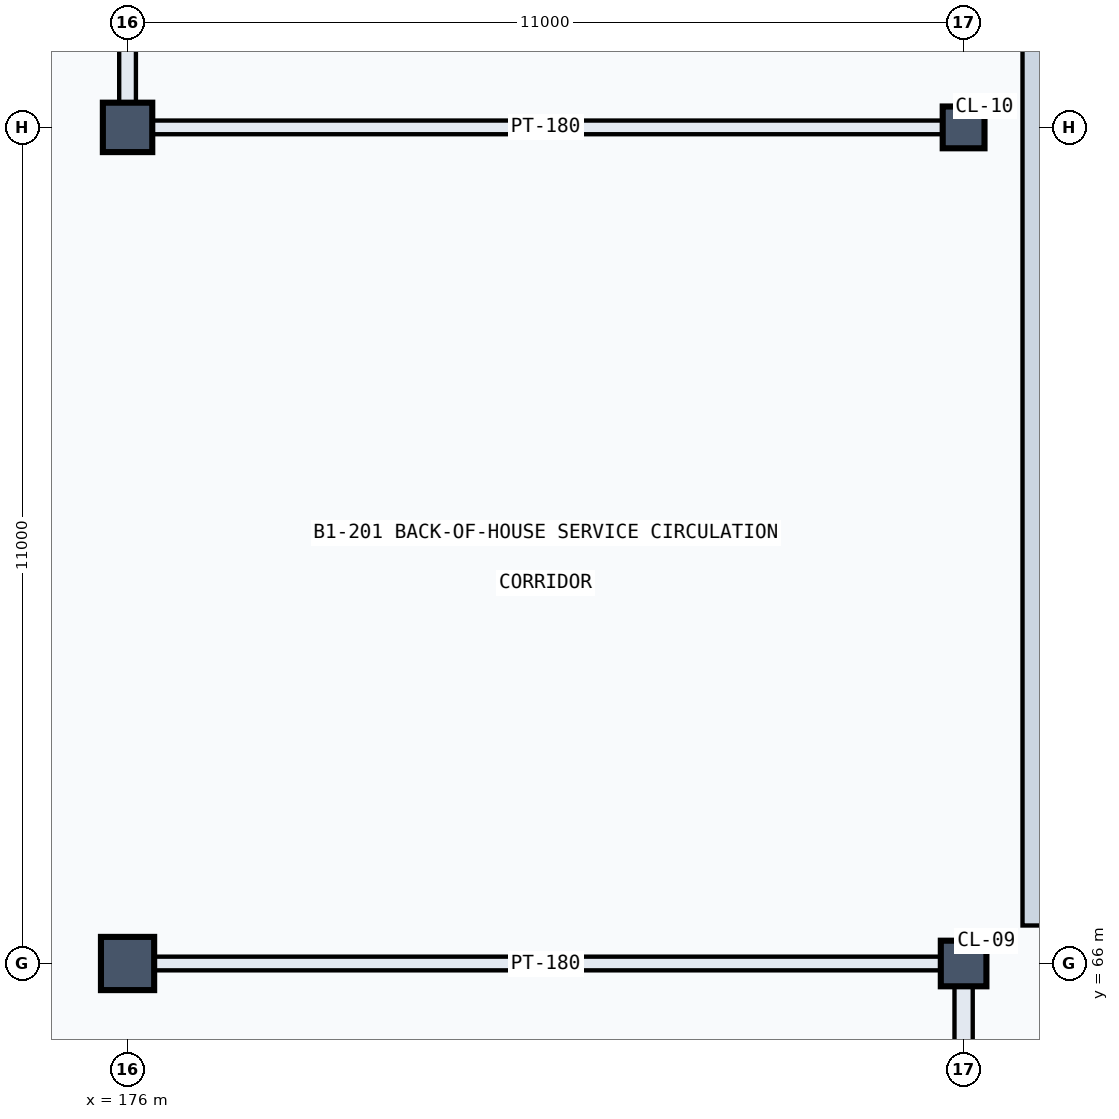
"""IFC4 building model, lengths in metres.
Left out: names, types, materials, properties, quantities, classifications, styles, units other than length and angle.
Written with IfcOpenShell. Run it as: python <this file> out.ifc"""

import sys

from ifc_helpers import new_model, si_unit, direction, frame, frame_2d, origin, origin_2d, place, context, subcontext, project, spatial, rectangle, extrude, element, save


model = new_model("IFC4")
c1 = context("Model", 3, precision=1e-05, world=origin(), true_north=direction((0.0, 1.0)))
c2 = subcontext(c1, "Body", "Model", "MODEL_VIEW")
j1 = project(units=[si_unit("LENGTHUNIT", "METRE"), si_unit("PLANEANGLEUNIT", "RADIAN")], contexts=[c1])
p1 = place(None, origin())
s1 = spatial("IfcSite", under=j1, at=p1, CompositionType="ELEMENT")
p2 = place(p1, origin())
s2 = spatial("IfcBuilding", under=s1, at=p2, CompositionType="ELEMENT")
p3 = place(p2, frame((0.0, 0.0, -5.4)))
s3 = spatial("IfcBuildingStorey", under=s2, at=p3, CompositionType="ELEMENT", Elevation=-5.4)
p4 = place(p3, frame((176.0, 66.0, 0.0), z_axis=(0.0, 0.0, 1.0), x_axis=(1.0, 0.0, 0.0)))
e1 = element("IfcColumn", 1, at=p4, inside=s3, PredefinedType="COLUMN", context=c2, shape_type="SweptSolid", body=[
    extrude(rectangle(XDim=0.7, YDim=0.7, at=origin_2d()), origin(), (0.0, 0.0, 1.0), 5.4),
])
p5 = place(p3, frame((176.0, 77.0, 0.0), z_axis=(0.0, 0.0, 1.0), x_axis=(1.0, 0.0, 0.0)))
e2 = element("IfcColumn", 2, at=p5, inside=s3, PredefinedType="COLUMN", context=c2, shape_type="SweptSolid", body=[
    extrude(rectangle(XDim=0.65, YDim=0.65, at=origin_2d()), origin(), (0.0, 0.0, 1.0), 5.4),
])
p6 = place(p3, frame((187.0, 66.0, 0.0), z_axis=(0.0, 0.0, 1.0), x_axis=(1.0, 0.0, 0.0)))
e3 = element("IfcColumn", 3, at=p6, inside=s3, PredefinedType="COLUMN", context=c2, shape_type="SweptSolid", body=[
    extrude(rectangle(XDim=0.6, YDim=0.6, at=origin_2d()), origin(), (0.0, 0.0, 1.0), 5.4),
])
p7 = place(p3, frame((187.0, 77.0, 0.0), z_axis=(0.0, 0.0, 1.0), x_axis=(1.0, 0.0, 0.0)))
e4 = element("IfcColumn", 4, at=p7, inside=s3, PredefinedType="COLUMN", context=c2, shape_type="SweptSolid", body=[
    extrude(rectangle(XDim=0.55, YDim=0.55, at=origin_2d()), origin(), (0.0, 0.0, 1.0), 5.4),
])
p8 = place(p3, frame((187.95, 66.5, 0.0), z_axis=(0.0, 0.0, 1.0), x_axis=(0.0, 1.0, 0.0)))
e5 = element("IfcWall", 5, at=p8, inside=s3, PredefinedType="SOLIDWALL", context=c2, shape_type="SweptSolid", body=[
    extrude(rectangle(XDim=42.7, YDim=0.35, at=frame_2d((21.35, 0.0))), origin(), (0.0, 0.0, 1.0), 3.88),
])
p9 = place(p3, frame((176.0, 77.22, 0.0), z_axis=(0.0, 0.0, 1.0), x_axis=(0.0, 1.0, 0.0)))
e6 = element("IfcWall", 6, at=p9, inside=s3, PredefinedType="PARTITIONING", context=c2, shape_type="SweptSolid", body=[
    extrude(rectangle(XDim=10.56, YDim=0.22, at=frame_2d((5.28, 0.0))), origin(), (0.0, 0.0, 1.0), 4.28),
])
p10 = place(p9, frame((4.75, 0.0, 0.0)))
e7 = element("IfcOpeningElement", 7, at=p10, cuts=e6, PredefinedType="OPENING", context=c2, shape_type="SweptSolid", body=[
    extrude(rectangle(XDim=1.06, YDim=2.3, at=frame_2d((0.53, 1.15))), frame((0.0, 0.12, 0.0), z_axis=(0.0, -1.0, 0.0), x_axis=(1.0, 0.0, 0.0)), (0.0, 0.0, 1.0), 0.24),
])
p11 = place(p3, frame((176.22, 66.0, 0.0), z_axis=(0.0, 0.0, 1.0), x_axis=(1.0, 0.0, 0.0)))
e8 = element("IfcWall", 8, at=p11, inside=s3, PredefinedType="PARTITIONING", context=c2, shape_type="SweptSolid", body=[
    extrude(rectangle(XDim=10.56, YDim=0.18, at=frame_2d((5.28, 0.0))), origin(), (0.0, 0.0, 1.0), 4.23),
])
p12 = place(p3, frame((176.22, 77.0, 0.0), z_axis=(0.0, 0.0, 1.0), x_axis=(1.0, 0.0, 0.0)))
e9 = element("IfcWall", 9, at=p12, inside=s3, PredefinedType="PARTITIONING", context=c2, shape_type="SweptSolid", body=[
    extrude(rectangle(XDim=10.56, YDim=0.18, at=frame_2d((5.28, 0.0))), origin(), (0.0, 0.0, 1.0), 4.28),
])
p13 = place(p3, frame((187.0, 55.22, 0.0), z_axis=(0.0, 0.0, 1.0), x_axis=(0.0, 1.0, 0.0)))
e10 = element("IfcWall", 10, at=p13, inside=s3, PredefinedType="PARTITIONING", context=c2, shape_type="SweptSolid", body=[
    extrude(rectangle(XDim=10.56, YDim=0.24, at=frame_2d((5.28, 0.0))), origin(), (0.0, 0.0, 1.0), 4.08),
])
save(model, sys.argv[1])
